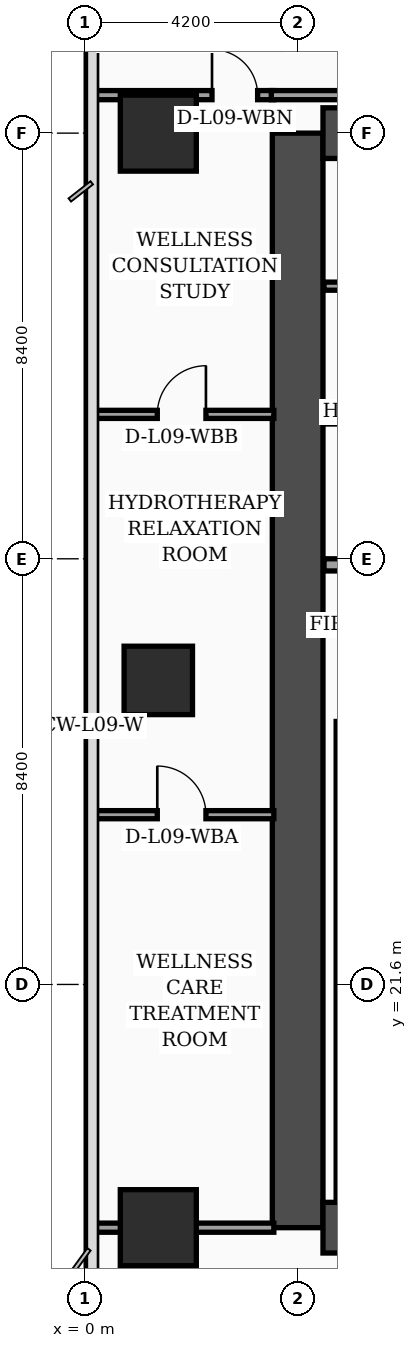
"""IFC4 building model, lengths in metres.
Left out: names, types, materials, properties, quantities, classifications, styles, units other than length and angle.
Written with IfcOpenShell. Run it as: python <this file> out.ifc"""

import sys

from ifc_helpers import new_model, si_unit, direction, frame, frame_2d, origin, origin_2d, place, context, subcontext, project, spatial, rectangle, extrude, element, fill, save


model = new_model("IFC4")
c1 = context("Model", 3, precision=1e-05, world=origin(), true_north=direction((0.0, 1.0)))
c2 = subcontext(c1, "Body", "Model", "MODEL_VIEW")
j1 = project(units=[si_unit("LENGTHUNIT", "METRE"), si_unit("PLANEANGLEUNIT", "RADIAN")], contexts=[c1])
p1 = place(None, origin())
s1 = spatial("IfcSite", under=j1, at=p1, CompositionType="ELEMENT")
p2 = place(p1, origin())
s2 = spatial("IfcBuilding", under=s1, at=p2, CompositionType="ELEMENT")
p3 = place(p2, frame((0.0, 0.0, 42.2)))
s3 = spatial("IfcBuildingStorey", under=s2, at=p3, CompositionType="ELEMENT", Elevation=42.2)
p4 = place(p3, frame((4.2, 16.8, 0.0), z_axis=(0.0, 0.0, 1.0), x_axis=(0.0, 1.0, 0.0)))
e1 = element("IfcWall", 1, at=p4, inside=s3, PredefinedType="SHEAR", context=c2, shape_type="SweptSolid", body=[
    extrude(rectangle(XDim=21.6, YDim=1.0, at=frame_2d((10.8, 0.0))), origin(), (0.0, 0.0, 1.0), 3.52),
])
for number, where, z_axis, x_axis in (
    (2, (4.7, 38.4, 0.0), (0.0, 0.0, 1.0), (1.0, 0.0, 0.0)),
    (3, (4.7, 16.8, 0.0), (0.0, 0.0, 1.0), (1.0, 0.0, 0.0)),
):
    element("IfcWall", number, at=place(p3, frame(where, z_axis=z_axis, x_axis=x_axis)), inside=s3, PredefinedType="SHEAR", context=c2, shape_type="SweptSolid", body=[
        extrude(rectangle(XDim=9.8, YDim=1.0, at=frame_2d((4.9, 0.0))), origin(), (0.0, 0.0, 1.0), 3.52),
    ])
p5 = place(p3, frame((5.08, 17.3, 0.0), z_axis=(0.0, 0.0, 1.0), x_axis=(0.0, 1.0, 0.0)))
e4 = element("IfcWall", 4, at=p5, inside=s3, PredefinedType="SOLIDWALL", context=c2, shape_type="SweptSolid", body=[
    extrude(rectangle(XDim=9.49, YDim=0.24, at=frame_2d((4.745, 0.0))), origin(), (0.0, 0.0, 1.0), 3.52),
])
p6 = place(p3, frame((1.45, 16.8, 0.0), z_axis=(0.0, 0.0, 1.0), x_axis=(1.0, 0.0, 0.0)))
e5 = element("IfcColumn", 5, at=p6, inside=s3, PredefinedType="COLUMN", context=c2, shape_type="SweptSolid", body=[
    extrude(rectangle(XDim=1.5, YDim=1.5, at=origin_2d()), origin(), (0.0, 0.0, 1.0), 3.52),
])
p7 = place(p3, frame((1.45, 27.6, 0.0), z_axis=(0.0, 0.0, 1.0), x_axis=(1.0, 0.0, 0.0)))
e6 = element("IfcColumn", 6, at=p7, inside=s3, PredefinedType="COLUMN", context=c2, shape_type="SweptSolid", body=[
    extrude(rectangle(XDim=1.35, YDim=1.35, at=origin_2d()), origin(), (0.0, 0.0, 1.0), 3.52),
])
p8 = place(p3, frame((1.45, 38.4, 0.0), z_axis=(0.0, 0.0, 1.0), x_axis=(1.0, 0.0, 0.0)))
e7 = element("IfcColumn", 7, at=p8, inside=s3, PredefinedType="COLUMN", context=c2, shape_type="SweptSolid", body=[
    extrude(rectangle(XDim=1.5, YDim=1.5, at=origin_2d()), origin(), (0.0, 0.0, 1.0), 3.52),
])
p9 = place(p3, frame((4.72, 29.88, 0.0), z_axis=(0.0, 0.0, 1.0), x_axis=(1.0, 0.0, 0.0)))
e8 = element("IfcWall", 8, at=p9, inside=s3, PredefinedType="SOLIDWALL", context=c2, shape_type="SweptSolid", body=[
    extrude(rectangle(XDim=4.7, YDim=0.24, at=frame_2d((2.35, 0.0))), origin(), (0.0, 0.0, 1.0), 3.52),
])
p10 = place(p9, frame((0.45, 0.0, 0.0)))
e9 = element("IfcOpeningElement", 9, at=p10, cuts=e8, PredefinedType="OPENING", context=c2, shape_type="SweptSolid", body=[
    extrude(rectangle(XDim=1.3, YDim=2.35, at=frame_2d((0.65, 1.175))), frame((0.0, 0.13, 0.0), z_axis=(0.0, -1.0, 0.0), x_axis=(1.0, 0.0, 0.0)), (0.0, 0.0, 1.0), 0.26),
])
p11 = place(p3, frame((4.72, 32.78, 0.0), z_axis=(0.0, 0.0, 1.0), x_axis=(1.0, 0.0, 0.0)))
e10 = element("IfcWall", 10, at=p11, inside=s3, PredefinedType="SOLIDWALL", context=c2, shape_type="SweptSolid", body=[
    extrude(rectangle(XDim=4.7, YDim=0.24, at=frame_2d((2.35, 0.0))), origin(), (0.0, 0.0, 1.0), 3.52),
])
p12 = place(p3, frame((4.72, 35.38, 0.0), z_axis=(0.0, 0.0, 1.0), x_axis=(1.0, 0.0, 0.0)))
e11 = element("IfcWall", 11, at=p12, inside=s3, PredefinedType="PARTITIONING", context=c2, shape_type="SweptSolid", body=[
    extrude(rectangle(XDim=4.7, YDim=0.16, at=frame_2d((2.35, 0.0))), origin(), (0.0, 0.0, 1.0), 3.52),
])
p13 = place(p12, frame((1.3, 0.0, 0.0)))
e12 = element("IfcOpeningElement", 12, at=p13, cuts=e11, PredefinedType="OPENING", context=c2, shape_type="SweptSolid", body=[
    extrude(rectangle(XDim=0.98, YDim=2.15, at=frame_2d((0.49, 1.075))), frame((0.0, 0.09, 0.0), z_axis=(0.0, -1.0, 0.0), x_axis=(1.0, 0.0, 0.0)), (0.0, 0.0, 1.0), 0.18),
])
p14 = place(p3, frame((0.08, 24.95, 0.0), z_axis=(0.0, 0.0, 1.0), x_axis=(1.0, 0.0, 0.0)))
e13 = element("IfcWall", 13, at=p14, inside=s3, PredefinedType="PARTITIONING", context=c2, shape_type="SweptSolid", body=[
    extrude(rectangle(XDim=3.65, YDim=0.16, at=frame_2d((1.825, 0.0))), origin(), (0.0, 0.0, 1.0), 3.02),
])
p15 = place(p14, frame((1.35, 0.0, 0.0)))
e14 = element("IfcOpeningElement", 14, at=p15, cuts=e13, PredefinedType="OPENING", context=c2, shape_type="SweptSolid", body=[
    extrude(rectangle(XDim=0.96, YDim=2.2, at=frame_2d((0.48, 1.1))), frame((0.0, 0.09, 0.0), z_axis=(0.0, -1.0, 0.0), x_axis=(1.0, 0.0, 0.0)), (0.0, 0.0, 1.0), 0.18),
])
p16 = place(p3, frame((0.08, 32.85, 0.0), z_axis=(0.0, 0.0, 1.0), x_axis=(1.0, 0.0, 0.0)))
e15 = element("IfcWall", 15, at=p16, inside=s3, PredefinedType="PARTITIONING", context=c2, shape_type="SweptSolid", body=[
    extrude(rectangle(XDim=3.65, YDim=0.16, at=frame_2d((1.825, 0.0))), origin(), (0.0, 0.0, 1.0), 3.02),
])
p17 = place(p16, frame((1.35, 0.0, 0.0)))
e16 = element("IfcOpeningElement", 16, at=p17, cuts=e15, PredefinedType="OPENING", context=c2, shape_type="SweptSolid", body=[
    extrude(rectangle(XDim=0.96, YDim=2.2, at=frame_2d((0.48, 1.1))), frame((0.0, 0.09, 0.0), z_axis=(0.0, -1.0, 0.0), x_axis=(1.0, 0.0, 0.0)), (0.0, 0.0, 1.0), 0.18),
])
p18 = place(p3, frame((0.08, 16.8, 0.0), z_axis=(0.0, 0.0, 1.0), x_axis=(1.0, 0.0, 0.0)))
e17 = element("IfcWall", 17, at=p18, inside=s3, PredefinedType="PARTITIONING", context=c2, shape_type="SweptSolid", body=[
    extrude(rectangle(XDim=3.65, YDim=0.18, at=frame_2d((1.825, 0.0))), origin(), (0.0, 0.0, 1.0), 2.82),
])
p19 = place(p3, frame((0.08, 39.15, 0.0), z_axis=(0.0, 0.0, 1.0), x_axis=(1.0, 0.0, 0.0)))
e18 = element("IfcWall", 18, at=p19, inside=s3, PredefinedType="PARTITIONING", context=c2, shape_type="SweptSolid", body=[
    extrude(rectangle(XDim=3.65, YDim=0.18, at=frame_2d((1.825, 0.0))), origin(), (0.0, 0.0, 1.0), 2.82),
])
p20 = place(p19, frame((2.43, 0.0, 0.0)))
e19 = element("IfcOpeningElement", 19, at=p20, cuts=e18, PredefinedType="OPENING", context=c2, shape_type="SweptSolid", body=[
    extrude(rectangle(XDim=0.9, YDim=2.15, at=frame_2d((0.45, 1.075))), frame((0.0, 0.1, 0.0), z_axis=(0.0, -1.0, 0.0), x_axis=(1.0, 0.0, 0.0)), (0.0, 0.0, 1.0), 0.2),
])
p21 = place(p3, frame((3.68, 39.15, 0.0), z_axis=(0.0, 0.0, 1.0), x_axis=(1.0, 0.0, 0.0)))
e20 = element("IfcWall", 20, at=p21, inside=s3, PredefinedType="PARTITIONING", context=c2, shape_type="SweptSolid", body=[
    extrude(rectangle(XDim=11.47, YDim=0.18, at=frame_2d((5.735, 0.0))), origin(), (0.0, 0.0, 1.0), 2.82),
])
p22 = place(p15, origin())
e21 = element("IfcDoor", 21, at=p22, inside=s3, OperationType="SINGLE_SWING_LEFT", PredefinedType="DOOR", context=c2, shape_type="SweptSolid", body=[
    extrude(rectangle(XDim=0.96, YDim=2.2, at=frame_2d((0.48, 1.1))), frame((0.0, 0.025, 0.0), z_axis=(0.0, -1.0, 0.0), x_axis=(1.0, 0.0, 0.0)), (0.0, 0.0, 1.0), 0.05),
])
fill(e14, e21)
p23 = place(p17, origin())
e22 = element("IfcDoor", 22, at=p23, inside=s3, OperationType="SINGLE_SWING_RIGHT", PredefinedType="DOOR", context=c2, shape_type="SweptSolid", body=[
    extrude(rectangle(XDim=0.96, YDim=2.2, at=frame_2d((0.48, 1.1))), frame((0.0, 0.025, 0.0), z_axis=(0.0, -1.0, 0.0), x_axis=(1.0, 0.0, 0.0)), (0.0, 0.0, 1.0), 0.05),
])
fill(e16, e22)
p24 = place(p20, origin())
e23 = element("IfcDoor", 23, at=p24, inside=s3, OperationType="SINGLE_SWING_LEFT", PredefinedType="DOOR", context=c2, shape_type="SweptSolid", body=[
    extrude(rectangle(XDim=0.9, YDim=2.15, at=frame_2d((0.45, 1.075))), frame((0.0, 0.025, 0.0), z_axis=(0.0, -1.0, 0.0), x_axis=(1.0, 0.0, 0.0)), (0.0, 0.0, 1.0), 0.05),
])
fill(e19, e23)
save(model, sys.argv[1])
